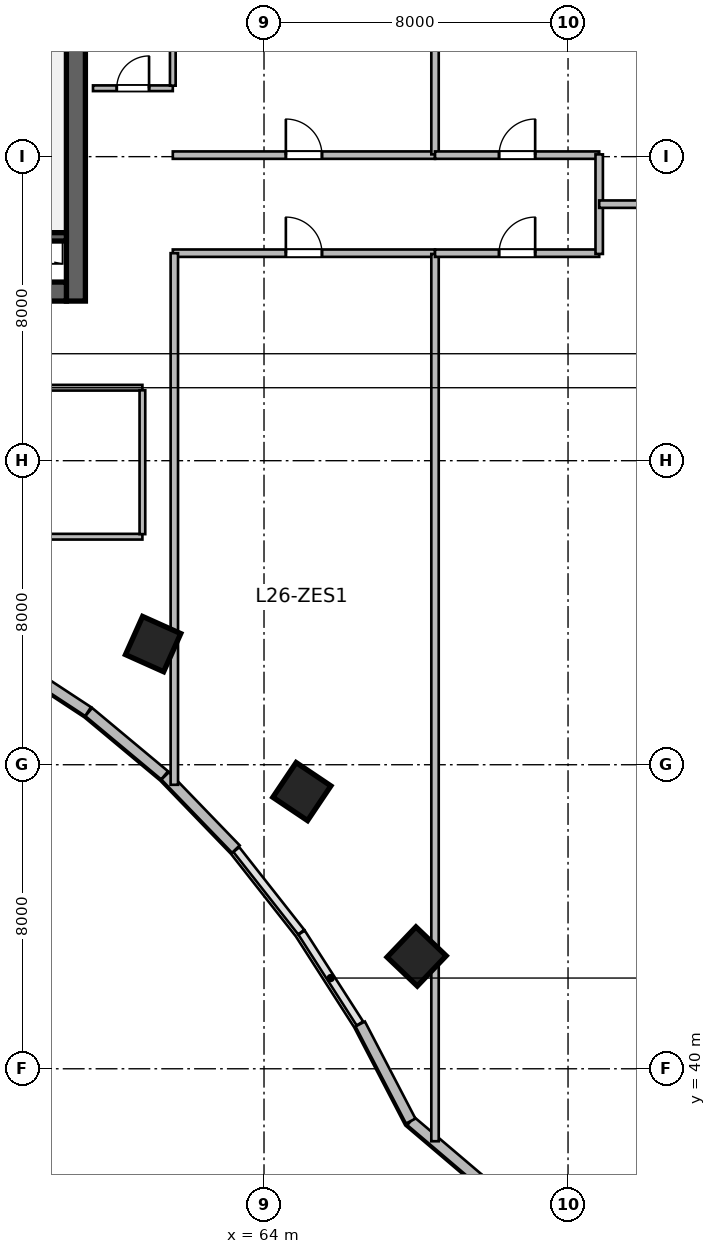
"""IFC4 building model, lengths in metres.
Left out: names, types, materials, properties, quantities, classifications, styles, units other than length and angle.
Written with IfcOpenShell. Run it as: python <this file> out.ifc"""

import sys

from ifc_helpers import new_model, si_unit, direction, frame, frame_2d, origin, origin_2d, place, context, subcontext, project, spatial, rectangle, extrude, source, transform, mapped, element, fill, save


model = new_model("IFC4")
c1 = context("Model", 3, precision=1e-05, world=origin(), true_north=direction((0.0, 1.0)))
c2 = subcontext(c1, "Body", "Model", "MODEL_VIEW")
j1 = project(units=[si_unit("LENGTHUNIT", "METRE"), si_unit("PLANEANGLEUNIT", "RADIAN")], contexts=[c1])
p1 = place(None, origin())
s1 = spatial("IfcSite", under=j1, at=p1, CompositionType="ELEMENT")
p2 = place(p1, origin())
s2 = spatial("IfcBuilding", under=s1, at=p2, CompositionType="ELEMENT")
p3 = place(p2, frame((0.0, 0.0, 111.6)))
s3 = spatial("IfcBuildingStorey", under=s2, at=p3, CompositionType="ELEMENT", Elevation=111.6)
m1 = source(origin(), c2, "Body", "SweptSolid", [
    extrude(rectangle(XDim=12.0, YDim=0.5, at=frame_2d((6.0, 0.0))), origin(), (0.0, 0.0, 1.0), 3.9),
])
p4 = place(p3, frame((59.05, 60.2, 0.0), z_axis=(0.0, 0.0, 1.0), x_axis=(0.0, 1.0, 0.0)))
e1 = element("IfcWall", 1, at=p4, inside=s3, PredefinedType="SHEAR", context=c2, shape_type="MappedRepresentation", body=[
    mapped(m1, transform((0.0, 0.0, 0.0), scale=1.0)),
])
m2 = source(origin(), c2, "Body", "SweptSolid", [
    extrude(rectangle(XDim=21.6, YDim=0.5, at=frame_2d((10.8, 0.0))), origin(), (0.0, 0.0, 1.0), 3.9),
])
p5 = place(p3, frame((37.2, 60.45, 0.0), z_axis=(0.0, 0.0, 1.0), x_axis=(1.0, 0.0, 0.0)))
e2 = element("IfcWall", 2, at=p5, inside=s3, PredefinedType="SHEAR", context=c2, shape_type="MappedRepresentation", body=[
    mapped(m2, transform((0.0, 0.0, 0.0), scale=1.0)),
])
p6 = place(p5, frame((1.1, 0.0, 0.0)))
e3 = element("IfcOpeningElement", 3, at=p6, cuts=e2, PredefinedType="OPENING", context=c2, shape_type="SweptSolid", body=[
    extrude(rectangle(XDim=1.15, YDim=2.15, at=frame_2d((0.575, 1.075))), frame((0.0, 0.26, 0.0), z_axis=(0.0, -1.0, 0.0), x_axis=(1.0, 0.0, 0.0)), (0.0, 0.0, 1.0), 0.52),
])
p7 = place(p5, frame((19.5, 0.0, 0.0)))
e4 = element("IfcOpeningElement", 4, at=p7, cuts=e2, PredefinedType="OPENING", context=c2, shape_type="SweptSolid", body=[
    extrude(rectangle(XDim=0.9, YDim=2.1, at=frame_2d((0.45, 1.05))), frame((0.0, 0.26, 0.0), z_axis=(0.0, -1.0, 0.0), x_axis=(1.0, 0.0, 0.0)), (0.0, 0.0, 1.0), 0.52),
])
p8 = place(p5, frame((12.02, 0.0, 0.0)))
e5 = element("IfcOpeningElement", 5, at=p8, cuts=e2, PredefinedType="OPENING", context=c2, shape_type="SweptSolid", body=[
    extrude(rectangle(XDim=1.6, YDim=2.15, at=frame_2d((0.8, 1.075))), frame((0.0, 0.26, 0.0), z_axis=(0.0, -1.0, 0.0), x_axis=(1.0, 0.0, 0.0)), (0.0, 0.0, 1.0), 0.52),
])
m3 = source(origin(), c2, "Body", "SweptSolid", [
    extrude(rectangle(XDim=3.27, YDim=0.22, at=frame_2d((1.635, 0.0))), origin(), (0.0, 0.0, 1.0), 3.9),
])
p9 = place(p3, frame((55.53, 61.89, 0.0), z_axis=(0.0, 0.0, 1.0), x_axis=(1.0, 0.0, 0.0)))
e6 = element("IfcWall", 6, at=p9, inside=s3, PredefinedType="SHEAR", context=c2, shape_type="MappedRepresentation", body=[
    mapped(m3, transform((0.0, 0.0, 0.0), scale=1.0)),
])
m4 = source(origin(), c2, "Body", "SweptSolid", [
    extrude(rectangle(XDim=1.1, YDim=1.1, at=origin_2d()), origin(), (0.0, 0.0, 1.0), 3.9),
])
for number, where, z_axis, x_axis in (
    (7, (61.082, 51.175, 0.0), (0.0, 0.0, 1.0), (0.409, 0.912, 0.0)),
    (8, (64.996, 47.294, 0.0), (0.0, 0.0, 1.0), (0.558, 0.83, 0.0)),
    (9, (68.015, 42.955, 0.0), (0.0, 0.0, 1.0), (0.691, 0.723, 0.0)),
):
    element("IfcColumn", number, at=place(p3, frame(where, z_axis=z_axis, x_axis=x_axis)), inside=s3, PredefinedType="COLUMN", context=c2, shape_type="MappedRepresentation", body=[
        mapped(m4, transform((0.0, 0.0, 0.0), scale=1.0)),
    ])
m5 = source(origin(), c2, "Body", "SweptSolid", [
    extrude(rectangle(XDim=4.659, YDim=0.28, at=frame_2d((2.33, 0.0))), origin(), (0.0, 0.0, 1.0), 3.65),
])
p10 = place(p3, frame((71.41, 35.606, 0.0), z_axis=(0.0, 0.0, 1.0), x_axis=(-0.761913458795, 0.647678841176, 0.0)))
e10 = element("IfcWall", 10, at=p10, inside=s3, PredefinedType="SOLIDWALL", context=c2, shape_type="MappedRepresentation", body=[
    mapped(m5, transform((0.0, 0.0, 0.0), scale=1.0)),
])
p11 = place(p10, frame((0.16, 0.0, 0.95)))
e11 = element("IfcOpeningElement", 11, at=p11, cuts=e10, PredefinedType="OPENING", context=c2, shape_type="SweptSolid", body=[
    extrude(rectangle(XDim=2.2, YDim=2.1, at=frame_2d((1.1, 1.05))), frame((0.0, 0.15, 0.0), z_axis=(0.0, -1.0, 0.0), x_axis=(1.0, 0.0, 0.0)), (0.0, 0.0, 1.0), 0.3),
])
m6 = source(origin(), c2, "Body", "SweptSolid", [
    extrude(rectangle(XDim=2.88, YDim=0.28, at=frame_2d((1.44, 0.0))), origin(), (0.0, 0.0, 1.0), 3.65),
])
p12 = place(p3, frame((67.861, 38.624, 0.0), z_axis=(0.0, 0.0, 1.0), x_axis=(-0.461769086658, 0.887000175088, 0.0)))
e12 = element("IfcWall", 12, at=p12, inside=s3, PredefinedType="SOLIDWALL", context=c2, shape_type="MappedRepresentation", body=[
    mapped(m6, transform((0.0, 0.0, 0.0), scale=1.0)),
])
m7 = source(origin(), c2, "Body", "SweptSolid", [
    extrude(rectangle(XDim=2.68, YDim=0.28, at=frame_2d((1.34, 0.0))), origin(), (0.0, 0.0, 1.0), 3.65),
])
p13 = place(p3, frame((63.26, 45.78, 0.0), z_axis=(0.0, 0.0, 1.0), x_axis=(-0.694561996568, 0.719432855049, 0.0)))
e13 = element("IfcWall", 13, at=p13, inside=s3, PredefinedType="SOLIDWALL", context=c2, shape_type="MappedRepresentation", body=[
    mapped(m7, transform((0.0, 0.0, 0.0), scale=1.0)),
])
m8 = source(origin(), c2, "Body", "SweptSolid", [
    extrude(rectangle(XDim=2.601, YDim=0.28, at=frame_2d((1.3, 0.0))), origin(), (0.0, 0.0, 1.0), 3.65),
])
p14 = place(p3, frame((61.385, 47.721, 0.0), z_axis=(0.0, 0.0, 1.0), x_axis=(-0.76796730295, 0.640489048775, 0.0)))
e14 = element("IfcWall", 14, at=p14, inside=s3, PredefinedType="SOLIDWALL", context=c2, shape_type="MappedRepresentation", body=[
    mapped(m8, transform((0.0, 0.0, 0.0), scale=1.0)),
])
m9 = source(origin(), c2, "Body", "SweptSolid", [
    extrude(rectangle(XDim=2.527, YDim=0.28, at=frame_2d((1.264, 0.0))), origin(), (0.0, 0.0, 1.0), 3.65),
])
p15 = place(p3, frame((59.371, 49.399, 0.0), z_axis=(0.0, 0.0, 1.0), x_axis=(-0.836011905051, 0.548711303523, 0.0)))
e15 = element("IfcWall", 15, at=p15, inside=s3, PredefinedType="SOLIDWALL", context=c2, shape_type="MappedRepresentation", body=[
    mapped(m9, transform((0.0, 0.0, 0.0), scale=1.0)),
])
m10 = source(origin(), c2, "Body", "SweptSolid", [
    extrude(rectangle(XDim=4.908, YDim=0.28, at=frame_2d((2.454, 0.0))), origin(), (0.0, 0.0, 1.0), 3.65),
])
p16 = place(p3, frame((72.275, 68.907, 0.0), z_axis=(0.0, 0.0, 1.0), x_axis=(0.694613154328, -0.719383462302, 0.0)))
e16 = element("IfcWall", 16, at=p16, inside=s3, PredefinedType="SOLIDWALL", context=c2, shape_type="MappedRepresentation", body=[
    mapped(m10, transform((0.0, 0.0, 0.0), scale=1.0)),
])
m11 = source(origin(), c2, "Body", "SweptSolid", [
    extrude(rectangle(XDim=2.1, YDim=0.15, at=frame_2d((1.05, 0.0))), origin(), (0.0, 0.0, 1.0), 3.65),
])
p17 = place(p3, frame((59.5, 65.8, 0.0), z_axis=(0.0, 0.0, 1.0), x_axis=(1.0, 0.0, 0.0)))
e17 = element("IfcWall", 17, at=p17, inside=s3, PredefinedType="PARTITIONING", context=c2, shape_type="MappedRepresentation", body=[
    mapped(m11, transform((0.0, 0.0, 0.0), scale=1.0)),
])
p18 = place(p17, frame((0.625, 0.0, 0.0)))
e18 = element("IfcOpeningElement", 18, at=p18, cuts=e17, PredefinedType="OPENING", context=c2, shape_type="SweptSolid", body=[
    extrude(rectangle(XDim=0.85, YDim=2.1, at=frame_2d((0.425, 1.05))), frame((0.0, 0.085, 0.0), z_axis=(0.0, -1.0, 0.0), x_axis=(1.0, 0.0, 0.0)), (0.0, 0.0, 1.0), 0.17),
])
m12 = source(origin(), c2, "Body", "SweptSolid", [
    extrude(rectangle(XDim=3.565, YDim=0.15, at=frame_2d((1.783, 0.0))), origin(), (0.0, 0.0, 1.0), 3.65),
])
p19 = place(p3, frame((61.6, 65.867, 0.0), z_axis=(0.0, 0.0, 1.0), x_axis=(0.0, 1.0, 0.0)))
e19 = element("IfcWall", 19, at=p19, inside=s3, PredefinedType="PARTITIONING", context=c2, shape_type="MappedRepresentation", body=[
    mapped(m12, transform((0.0, 0.0, 0.0), scale=1.0)),
])
m13 = source(origin(), c2, "Body", "SweptSolid", [
    extrude(rectangle(XDim=6.6, YDim=0.15, at=frame_2d((3.3, 0.0))), origin(), (0.0, 0.0, 1.0), 3.095),
])
p20 = place(p3, frame((54.2, 54.0, 0.0), z_axis=(0.0, 0.0, 1.0), x_axis=(1.0, 0.0, 0.0)))
e20 = element("IfcWall", 20, at=p20, inside=s3, PredefinedType="PARTITIONING", context=c2, shape_type="MappedRepresentation", body=[
    mapped(m13, transform((0.0, 0.0, 0.0), scale=1.0)),
])
m14 = source(origin(), c2, "Body", "SweptSolid", [
    extrude(rectangle(XDim=6.6, YDim=0.15, at=frame_2d((3.3, 0.0))), origin(), (0.0, 0.0, 1.0), 3.65),
])
p21 = place(p3, frame((54.2, 57.92, 0.0), z_axis=(0.0, 0.0, 1.0), x_axis=(1.0, 0.0, 0.0)))
e21 = element("IfcWall", 21, at=p21, inside=s3, PredefinedType="PARTITIONING", context=c2, shape_type="MappedRepresentation", body=[
    mapped(m14, transform((0.0, 0.0, 0.0), scale=1.0)),
])
p22 = place(p21, frame((2.825, 0.0, 0.0)))
e22 = element("IfcOpeningElement", 22, at=p22, cuts=e21, PredefinedType="OPENING", context=c2, shape_type="SweptSolid", body=[
    extrude(rectangle(XDim=0.95, YDim=2.1, at=frame_2d((0.475, 1.05))), frame((0.0, 0.085, 0.0), z_axis=(0.0, -1.0, 0.0), x_axis=(1.0, 0.0, 0.0)), (0.0, 0.0, 1.0), 0.17),
])
m15 = source(origin(), c2, "Body", "SweptSolid", [
    extrude(rectangle(XDim=3.785, YDim=0.15, at=frame_2d((1.893, 0.0))), origin(), (0.0, 0.0, 1.0), 3.65),
])
p23 = place(p3, frame((60.8, 54.067, 0.0), z_axis=(0.0, 0.0, 1.0), x_axis=(0.0, 1.0, 0.0)))
e23 = element("IfcWall", 23, at=p23, inside=s3, PredefinedType="PARTITIONING", context=c2, shape_type="MappedRepresentation", body=[
    mapped(m15, transform((0.0, 0.0, 0.0), scale=1.0)),
])
m16 = source(origin(), c2, "Body", "SweptSolid", [
    extrude(rectangle(XDim=6.9, YDim=0.195, at=frame_2d((3.45, 0.0))), origin(), (0.0, 0.0, 1.0), 3.65),
])
p24 = place(p3, frame((61.6, 64.04, 0.0), z_axis=(0.0, 0.0, 1.0), x_axis=(1.0, 0.0, 0.0)))
e24 = element("IfcWall", 24, at=p24, inside=s3, PredefinedType="PARTITIONING", context=c2, shape_type="MappedRepresentation", body=[
    mapped(m16, transform((0.0, 0.0, 0.0), scale=1.0)),
])
p25 = place(p24, frame((2.975, 0.0, 0.0)))
e25 = element("IfcOpeningElement", 25, at=p25, cuts=e24, PredefinedType="OPENING", context=c2, shape_type="SweptSolid", body=[
    extrude(rectangle(XDim=0.95, YDim=2.1, at=frame_2d((0.475, 1.05))), frame((0.0, 0.107, 0.0), z_axis=(0.0, -1.0, 0.0), x_axis=(1.0, 0.0, 0.0)), (0.0, 0.0, 1.0), 0.215),
])
m17 = source(origin(), c2, "Body", "SweptSolid", [
    extrude(rectangle(XDim=7.963, YDim=0.195, at=frame_2d((3.982, 0.0))), origin(), (0.0, 0.0, 1.0), 2.942),
])
p26 = place(p3, frame((68.5, 64.06, 0.0), z_axis=(0.0, 0.0, 1.0), x_axis=(0.0, 1.0, 0.0)))
e26 = element("IfcWall", 26, at=p26, inside=s3, PredefinedType="PARTITIONING", context=c2, shape_type="MappedRepresentation", body=[
    mapped(m17, transform((0.0, 0.0, 0.0), scale=1.0)),
])
m18 = source(origin(), c2, "Body", "SweptSolid", [
    extrude(rectangle(XDim=4.32, YDim=0.195, at=frame_2d((2.16, 0.0))), origin(), (0.0, 0.0, 1.0), 3.65),
])
p27 = place(p3, frame((68.5, 64.04, 0.0), z_axis=(0.0, 0.0, 1.0), x_axis=(1.0, 0.0, 0.0)))
e27 = element("IfcWall", 27, at=p27, inside=s3, PredefinedType="PARTITIONING", context=c2, shape_type="MappedRepresentation", body=[
    mapped(m18, transform((0.0, 0.0, 0.0), scale=1.0)),
])
p28 = place(p27, frame((1.685, 0.0, 0.0)))
e28 = element("IfcOpeningElement", 28, at=p28, cuts=e27, PredefinedType="OPENING", context=c2, shape_type="SweptSolid", body=[
    extrude(rectangle(XDim=0.95, YDim=2.1, at=frame_2d((0.475, 1.05))), frame((0.0, 0.107, 0.0), z_axis=(0.0, -1.0, 0.0), x_axis=(1.0, 0.0, 0.0)), (0.0, 0.0, 1.0), 0.215),
])
p29 = place(p3, frame((61.6, 61.46, 0.0), z_axis=(0.0, 0.0, 1.0), x_axis=(1.0, 0.0, 0.0)))
e29 = element("IfcWall", 29, at=p29, inside=s3, PredefinedType="PARTITIONING", context=c2, shape_type="MappedRepresentation", body=[
    mapped(m16, transform((0.0, 0.0, 0.0), scale=1.0)),
])
p30 = place(p29, frame((2.975, 0.0, 0.0)))
e30 = element("IfcOpeningElement", 30, at=p30, cuts=e29, PredefinedType="OPENING", context=c2, shape_type="SweptSolid", body=[
    extrude(rectangle(XDim=0.95, YDim=2.1, at=frame_2d((0.475, 1.05))), frame((0.0, 0.107, 0.0), z_axis=(0.0, -1.0, 0.0), x_axis=(1.0, 0.0, 0.0)), (0.0, 0.0, 1.0), 0.215),
])
m19 = source(origin(), c2, "Body", "SweptSolid", [
    extrude(rectangle(XDim=23.346, YDim=0.195, at=frame_2d((11.673, 0.0))), origin(), (0.0, 0.0, 1.0), 2.942),
])
p31 = place(p3, frame((68.5, 38.094, 0.0), z_axis=(0.0, 0.0, 1.0), x_axis=(0.0, 1.0, 0.0)))
e31 = element("IfcWall", 31, at=p31, inside=s3, PredefinedType="PARTITIONING", context=c2, shape_type="MappedRepresentation", body=[
    mapped(m19, transform((0.0, 0.0, 0.0), scale=1.0)),
])
p32 = place(p3, frame((68.5, 61.46, 0.0), z_axis=(0.0, 0.0, 1.0), x_axis=(1.0, 0.0, 0.0)))
e32 = element("IfcWall", 32, at=p32, inside=s3, PredefinedType="PARTITIONING", context=c2, shape_type="MappedRepresentation", body=[
    mapped(m18, transform((0.0, 0.0, 0.0), scale=1.0)),
])
p33 = place(p32, frame((1.685, 0.0, 0.0)))
e33 = element("IfcOpeningElement", 33, at=p33, cuts=e32, PredefinedType="OPENING", context=c2, shape_type="SweptSolid", body=[
    extrude(rectangle(XDim=0.95, YDim=2.1, at=frame_2d((0.475, 1.05))), frame((0.0, 0.107, 0.0), z_axis=(0.0, -1.0, 0.0), x_axis=(1.0, 0.0, 0.0)), (0.0, 0.0, 1.0), 0.215),
])
m20 = source(origin(), c2, "Body", "SweptSolid", [
    extrude(rectangle(XDim=13.988, YDim=0.195, at=frame_2d((6.994, 0.0))), origin(), (0.0, 0.0, 1.0), 2.942),
])
p34 = place(p3, frame((61.64, 47.472, 0.0), z_axis=(0.0, 0.0, 1.0), x_axis=(0.0, 1.0, 0.0)))
e34 = element("IfcWall", 34, at=p34, inside=s3, PredefinedType="PARTITIONING", context=c2, shape_type="MappedRepresentation", body=[
    mapped(m20, transform((0.0, 0.0, 0.0), scale=1.0)),
])
m21 = source(origin(), c2, "Body", "SweptSolid", [
    extrude(rectangle(XDim=2.62, YDim=0.195, at=frame_2d((1.31, 0.0))), origin(), (0.0, 0.0, 1.0), 3.324),
])
p35 = place(p3, frame((72.82, 61.44, 0.0), z_axis=(0.0, 0.0, 1.0), x_axis=(0.0, 1.0, 0.0)))
e35 = element("IfcWall", 35, at=p35, inside=s3, PredefinedType="PARTITIONING", context=c2, shape_type="MappedRepresentation", body=[
    mapped(m21, transform((0.0, 0.0, 0.0), scale=1.0)),
])
m22 = source(origin(), c2, "Body", "SweptSolid", [
    extrude(rectangle(XDim=4.917, YDim=0.195, at=frame_2d((2.459, 0.0))), origin(), (0.0, 0.0, 1.0), 3.65),
])
p36 = place(p3, frame((72.82, 62.75, 0.0), z_axis=(0.0, 0.0, 1.0), x_axis=(1.0, 0.0, 0.0)))
e36 = element("IfcWall", 36, at=p36, inside=s3, PredefinedType="PARTITIONING", context=c2, shape_type="MappedRepresentation", body=[
    mapped(m22, transform((0.0, 0.0, 0.0), scale=1.0)),
])
m23 = source(origin(), c2, "Body", "SweptSolid", [
    extrude(rectangle(XDim=0.85, YDim=2.1, at=frame_2d((0.425, 1.05))), frame((0.0, 0.025, 0.0), z_axis=(0.0, -1.0, 0.0), x_axis=(1.0, 0.0, 0.0)), (0.0, 0.0, 1.0), 0.05),
])
p37 = place(p18, origin())
e37 = element("IfcDoor", 37, at=p37, inside=s3, OperationType="SINGLE_SWING_RIGHT", PredefinedType="DOOR", context=c2, shape_type="MappedRepresentation", body=[
    mapped(m23, transform((0.0, 0.0, 0.0), scale=1.0)),
])
fill(e18, e37)
m24 = source(origin(), c2, "Body", "SweptSolid", [
    extrude(rectangle(XDim=0.95, YDim=2.1, at=frame_2d((0.475, 1.05))), frame((0.0, 0.025, 0.0), z_axis=(0.0, -1.0, 0.0), x_axis=(1.0, 0.0, 0.0)), (0.0, 0.0, 1.0), 0.05),
])
p38 = place(p25, origin())
e38 = element("IfcDoor", 38, at=p38, inside=s3, OperationType="SINGLE_SWING_LEFT", PredefinedType="DOOR", context=c2, shape_type="MappedRepresentation", body=[
    mapped(m24, transform((0.0, 0.0, 0.0), scale=1.0)),
])
fill(e25, e38)
p39 = place(p28, origin())
e39 = element("IfcDoor", 39, at=p39, inside=s3, OperationType="SINGLE_SWING_RIGHT", PredefinedType="DOOR", context=c2, shape_type="MappedRepresentation", body=[
    mapped(m24, transform((0.0, 0.0, 0.0), scale=1.0)),
])
fill(e28, e39)
p40 = place(p30, origin())
e40 = element("IfcDoor", 40, at=p40, inside=s3, OperationType="SINGLE_SWING_LEFT", PredefinedType="DOOR", context=c2, shape_type="MappedRepresentation", body=[
    mapped(m24, transform((0.0, 0.0, 0.0), scale=1.0)),
])
fill(e30, e40)
p41 = place(p33, origin())
e41 = element("IfcDoor", 41, at=p41, inside=s3, OperationType="SINGLE_SWING_RIGHT", PredefinedType="DOOR", context=c2, shape_type="MappedRepresentation", body=[
    mapped(m24, transform((0.0, 0.0, 0.0), scale=1.0)),
])
fill(e33, e41)
save(model, sys.argv[1])
